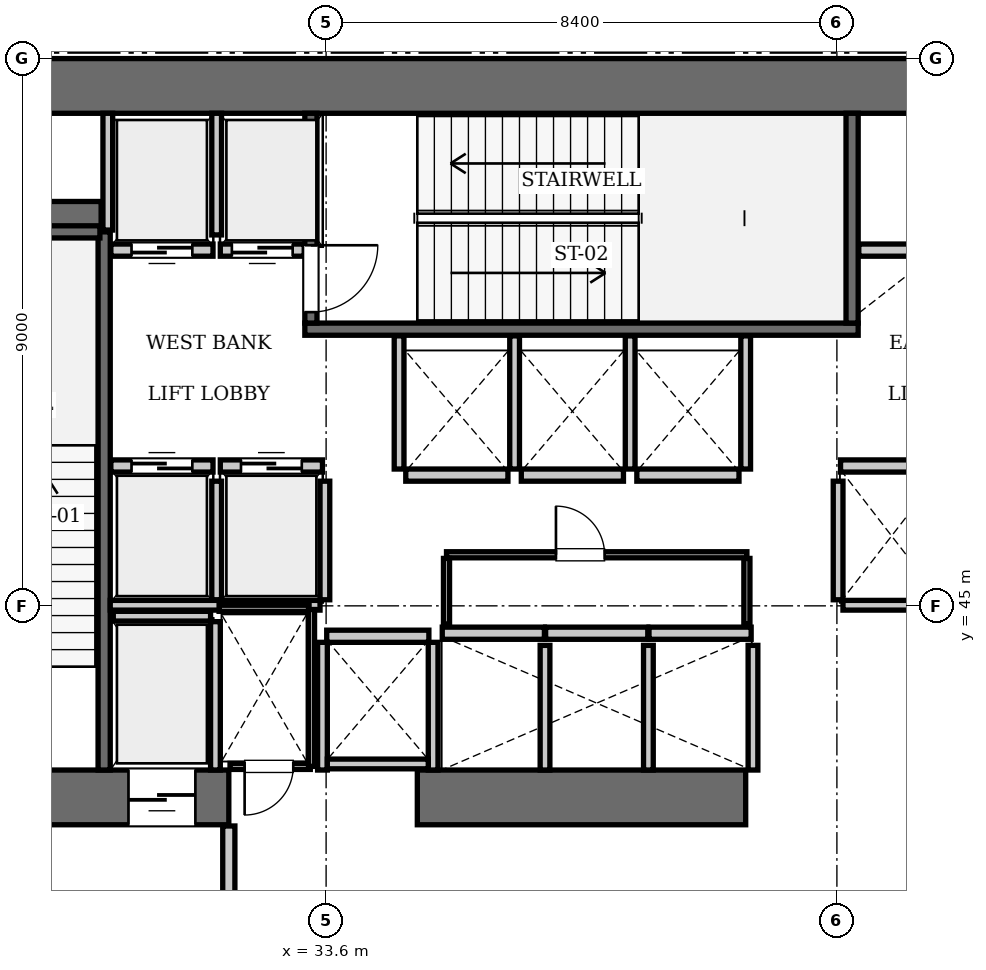
"""IFC4 building model, lengths in metres.
Left out: names, types, materials, properties, quantities, classifications, styles, units other than length and angle.
Written with IfcOpenShell. Run it as: python <this file> out.ifc"""

import sys

from ifc_helpers import new_model, si_unit, direction, frame, frame_2d, origin, place, context, subcontext, project, spatial, rectangle, extrude, element, fill, save


model = new_model("IFC4")
c1 = context("Model", 3, precision=1e-05, world=origin(), true_north=direction((0.0, 1.0)))
c2 = subcontext(c1, "Body", "Model", "MODEL_VIEW")
j1 = project(units=[si_unit("LENGTHUNIT", "METRE"), si_unit("PLANEANGLEUNIT", "RADIAN")], contexts=[c1])
p1 = place(None, origin())
s1 = spatial("IfcSite", under=j1, at=p1, CompositionType="ELEMENT")
p2 = place(p1, origin())
s2 = spatial("IfcBuilding", under=s1, at=p2, CompositionType="ELEMENT")
p3 = place(p2, frame((0.0, 0.0, 16.45)))
s3 = spatial("IfcBuildingStorey", under=s2, at=p3, CompositionType="ELEMENT", Elevation=16.45)
p4 = place(p3, frame((25.2, 53.55, 0.0), z_axis=(0.0, 0.0, 1.0), x_axis=(1.0, 0.0, 0.0)))
e1 = element("IfcWall", 1, at=p4, inside=s3, PredefinedType="SHEAR", context=c2, shape_type="SweptSolid", body=[
    extrude(rectangle(XDim=25.2, YDim=0.9, at=frame_2d((12.6, 0.0))), origin(), (0.0, 0.0, 1.0), 4.9),
])
p5 = place(p3, frame((25.2, 41.85, 0.0), z_axis=(0.0, 0.0, 1.0), x_axis=(1.0, 0.0, 0.0)))
e2 = element("IfcWall", 2, at=p5, inside=s3, PredefinedType="SHEAR", context=c2, shape_type="SweptSolid", body=[
    extrude(rectangle(XDim=6.8, YDim=0.9, at=frame_2d((3.4, 0.0))), origin(), (0.0, 0.0, 1.0), 4.9),
])
p6 = place(p5, frame((1.65, 0.0, 0.0)))
e3 = element("IfcOpeningElement", 3, at=p6, cuts=e2, PredefinedType="OPENING", context=c2, shape_type="SweptSolid", body=[
    extrude(rectangle(XDim=1.15, YDim=2.15, at=frame_2d((0.575, 1.075))), frame((0.0, 0.46, 0.0), z_axis=(0.0, -1.0, 0.0), x_axis=(1.0, 0.0, 0.0)), (0.0, 0.0, 1.0), 0.92),
])
p7 = place(p5, frame((5.15, 0.0, 0.0)))
e4 = element("IfcOpeningElement", 4, at=p7, cuts=e2, PredefinedType="OPENING", context=c2, shape_type="SweptSolid", body=[
    extrude(rectangle(XDim=1.1, YDim=2.2, at=frame_2d((0.55, 1.1))), frame((0.0, 0.46, 0.0), z_axis=(0.0, -1.0, 0.0), x_axis=(1.0, 0.0, 0.0)), (0.0, 0.0, 1.0), 0.92),
])
p8 = place(p3, frame((35.1, 41.85, 0.0), z_axis=(0.0, 0.0, 1.0), x_axis=(1.0, 0.0, 0.0)))
e5 = element("IfcWall", 5, at=p8, inside=s3, PredefinedType="SHEAR", context=c2, shape_type="SweptSolid", body=[
    extrude(rectangle(XDim=5.4, YDim=0.9, at=frame_2d((2.7, 0.0))), origin(), (0.0, 0.0, 1.0), 4.9),
])
p9 = place(p3, frame((26.1, 51.4, 0.0), z_axis=(0.0, 0.0, 1.0), x_axis=(1.0, 0.0, 0.0)))
e6 = element("IfcWall", 6, at=p9, inside=s3, PredefinedType="SHEAR", context=c2, shape_type="SweptSolid", body=[
    extrude(rectangle(XDim=3.8, YDim=0.5, at=frame_2d((1.9, 0.0))), origin(), (0.0, 0.0, 1.0), 4.9),
])
p10 = place(p3, frame((29.95, 42.3, 0.0), z_axis=(0.0, 0.0, 1.0), x_axis=(0.0, 1.0, 0.0)))
e7 = element("IfcWall", 7, at=p10, inside=s3, PredefinedType="SOLIDWALL", context=c2, shape_type="SweptSolid", body=[
    extrude(rectangle(XDim=8.85, YDim=0.2, at=frame_2d((4.425, 0.0))), origin(), (0.0, 0.0, 1.0), 4.62),
])
p11 = place(p3, frame((26.38, 51.15, 0.0), z_axis=(0.0, 0.0, 1.0), x_axis=(1.0, 0.0, 0.0)))
e8 = element("IfcWall", 8, at=p11, inside=s3, PredefinedType="SOLIDWALL", context=c2, shape_type="SweptSolid", body=[
    extrude(rectangle(XDim=3.5, YDim=0.2, at=frame_2d((1.75, 0.0))), origin(), (0.0, 0.0, 1.0), 4.62),
])
p12 = place(p3, frame((33.25, 49.55, 0.0), z_axis=(0.0, 0.0, 1.0), x_axis=(1.0, 0.0, 0.0)))
e9 = element("IfcWall", 9, at=p12, inside=s3, PredefinedType="SOLIDWALL", context=c2, shape_type="SweptSolid", body=[
    extrude(rectangle(XDim=9.1, YDim=0.2, at=frame_2d((4.55, 0.0))), origin(), (0.0, 0.0, 1.0), 4.62),
])
p13 = place(p3, frame((42.25, 49.65, 0.0), z_axis=(0.0, 0.0, 1.0), x_axis=(0.0, 1.0, 0.0)))
e10 = element("IfcWall", 10, at=p13, inside=s3, PredefinedType="SOLIDWALL", context=c2, shape_type="SweptSolid", body=[
    extrude(rectangle(XDim=3.45, YDim=0.2, at=frame_2d((1.725, 0.0))), origin(), (0.0, 0.0, 1.0), 4.62),
])
p14 = place(p3, frame((33.35, 49.65, 0.0), z_axis=(0.0, 0.0, 1.0), x_axis=(0.0, 1.0, 0.0)))
e11 = element("IfcWall", 11, at=p14, inside=s3, PredefinedType="SOLIDWALL", context=c2, shape_type="SweptSolid", body=[
    extrude(rectangle(XDim=3.45, YDim=0.2, at=frame_2d((1.725, 0.0))), origin(), (0.0, 0.0, 1.0), 4.62),
])
p15 = place(p14, frame((0.18, 0.0, 0.0)))
e12 = element("IfcOpeningElement", 12, at=p15, cuts=e11, PredefinedType="OPENING", context=c2, shape_type="SweptSolid", body=[
    extrude(rectangle(XDim=1.1, YDim=2.15, at=frame_2d((0.55, 1.075))), frame((0.0, 0.11, 0.0), z_axis=(0.0, -1.0, 0.0), x_axis=(1.0, 0.0, 0.0)), (0.0, 0.0, 1.0), 0.22),
])
p16 = place(p3, frame((30.06, 47.3, 0.0), z_axis=(0.0, 0.0, 1.0), x_axis=(1.0, 0.0, 0.0)))
e13 = element("IfcWall", 13, at=p16, inside=s3, PredefinedType="SOLIDWALL", context=c2, shape_type="SweptSolid", body=[
    extrude(rectangle(XDim=1.68, YDim=0.2, at=frame_2d((0.84, 0.0))), origin(), (0.0, 0.0, 1.0), 4.62),
])
p17 = place(p16, frame((0.34, 0.0, 0.0)))
e14 = element("IfcOpeningElement", 14, at=p17, cuts=e13, PredefinedType="OPENING", context=c2, shape_type="SweptSolid", body=[
    extrude(rectangle(XDim=1.0, YDim=2.15, at=frame_2d((0.5, 1.075))), frame((0.0, 0.11, 0.0), z_axis=(0.0, -1.0, 0.0), x_axis=(1.0, 0.0, 0.0)), (0.0, 0.0, 1.0), 0.22),
])
p18 = place(p3, frame((31.86, 47.3, 0.0), z_axis=(0.0, 0.0, 1.0), x_axis=(1.0, 0.0, 0.0)))
e15 = element("IfcWall", 15, at=p18, inside=s3, PredefinedType="SOLIDWALL", context=c2, shape_type="SweptSolid", body=[
    extrude(rectangle(XDim=1.68, YDim=0.2, at=frame_2d((0.84, 0.0))), origin(), (0.0, 0.0, 1.0), 4.62),
])
p19 = place(p18, frame((0.34, 0.0, 0.0)))
e16 = element("IfcOpeningElement", 16, at=p19, cuts=e15, PredefinedType="OPENING", context=c2, shape_type="SweptSolid", body=[
    extrude(rectangle(XDim=1.0, YDim=2.15, at=frame_2d((0.5, 1.075))), frame((0.0, 0.11, 0.0), z_axis=(0.0, -1.0, 0.0), x_axis=(1.0, 0.0, 0.0)), (0.0, 0.0, 1.0), 0.22),
])
p20 = place(p3, frame((30.06, 50.85, 0.0), z_axis=(0.0, 0.0, 1.0), x_axis=(1.0, 0.0, 0.0)))
e17 = element("IfcWall", 17, at=p20, inside=s3, PredefinedType="SOLIDWALL", context=c2, shape_type="SweptSolid", body=[
    extrude(rectangle(XDim=1.68, YDim=0.2, at=frame_2d((0.84, 0.0))), origin(), (0.0, 0.0, 1.0), 4.62),
])
p21 = place(p20, frame((0.34, 0.0, 0.0)))
e18 = element("IfcOpeningElement", 18, at=p21, cuts=e17, PredefinedType="OPENING", context=c2, shape_type="SweptSolid", body=[
    extrude(rectangle(XDim=1.0, YDim=2.15, at=frame_2d((0.5, 1.075))), frame((0.0, 0.11, 0.0), z_axis=(0.0, -1.0, 0.0), x_axis=(1.0, 0.0, 0.0)), (0.0, 0.0, 1.0), 0.22),
])
p22 = place(p3, frame((31.86, 50.85, 0.0), z_axis=(0.0, 0.0, 1.0), x_axis=(1.0, 0.0, 0.0)))
e19 = element("IfcWall", 19, at=p22, inside=s3, PredefinedType="SOLIDWALL", context=c2, shape_type="SweptSolid", body=[
    extrude(rectangle(XDim=1.38, YDim=0.2, at=frame_2d((0.69, 0.0))), origin(), (0.0, 0.0, 1.0), 4.62),
])
p23 = place(p22, frame((0.19, 0.0, 0.0)))
e20 = element("IfcOpeningElement", 20, at=p23, cuts=e19, PredefinedType="OPENING", context=c2, shape_type="SweptSolid", body=[
    extrude(rectangle(XDim=1.0, YDim=2.15, at=frame_2d((0.5, 1.075))), frame((0.0, 0.11, 0.0), z_axis=(0.0, -1.0, 0.0), x_axis=(1.0, 0.0, 0.0)), (0.0, 0.0, 1.0), 0.22),
])
p24 = place(p3, frame((42.06, 47.3, 0.0), z_axis=(0.0, 0.0, 1.0), x_axis=(1.0, 0.0, 0.0)))
e21 = element("IfcWall", 21, at=p24, inside=s3, PredefinedType="SOLIDWALL", context=c2, shape_type="SweptSolid", body=[
    extrude(rectangle(XDim=1.68, YDim=0.2, at=frame_2d((0.84, 0.0))), origin(), (0.0, 0.0, 1.0), 4.62),
])
p25 = place(p3, frame((42.36, 50.85, 0.0), z_axis=(0.0, 0.0, 1.0), x_axis=(1.0, 0.0, 0.0)))
e22 = element("IfcWall", 22, at=p25, inside=s3, PredefinedType="SOLIDWALL", context=c2, shape_type="SweptSolid", body=[
    extrude(rectangle(XDim=1.38, YDim=0.2, at=frame_2d((0.69, 0.0))), origin(), (0.0, 0.0, 1.0), 4.62),
])
for number, where, z_axis, x_axis in (
    (23, (35.51, 44.55, 0.0), (0.0, 0.0, 1.0), (1.0, 0.0, 0.0)),
    (24, (37.21, 44.55, 0.0), (0.0, 0.0, 1.0), (1.0, 0.0, 0.0)),
):
    element("IfcWall", number, at=place(p3, frame(where, z_axis=z_axis, x_axis=x_axis)), inside=s3, PredefinedType="SOLIDWALL", context=c2, shape_type="SweptSolid", body=[
        extrude(rectangle(XDim=1.68, YDim=0.2, at=frame_2d((0.84, 0.0))), origin(), (0.0, 0.0, 1.0), 4.62),
    ])
for number, where, z_axis, x_axis in (
    (25, (38.91, 44.55, 0.0), (0.0, 0.0, 1.0), (1.0, 0.0, 0.0)),
    (26, (34.91, 47.15, 0.0), (0.0, 0.0, 1.0), (1.0, 0.0, 0.0)),
):
    element("IfcWall", number, at=place(p3, frame(where, z_axis=z_axis, x_axis=x_axis)), inside=s3, PredefinedType="SOLIDWALL", context=c2, shape_type="SweptSolid", body=[
        extrude(rectangle(XDim=1.68, YDim=0.2, at=frame_2d((0.84, 0.0))), origin(), (0.0, 0.0, 1.0), 4.62),
    ])
for number, where, z_axis, x_axis in (
    (27, (36.81, 47.15, 0.0), (0.0, 0.0, 1.0), (1.0, 0.0, 0.0)),
    (28, (38.71, 47.15, 0.0), (0.0, 0.0, 1.0), (1.0, 0.0, 0.0)),
    (29, (33.61, 44.5, 0.0), (0.0, 0.0, 1.0), (1.0, 0.0, 0.0)),
):
    element("IfcWall", number, at=place(p3, frame(where, z_axis=z_axis, x_axis=x_axis)), inside=s3, PredefinedType="SOLIDWALL", context=c2, shape_type="SweptSolid", body=[
        extrude(rectangle(XDim=1.68, YDim=0.2, at=frame_2d((0.84, 0.0))), origin(), (0.0, 0.0, 1.0), 4.62),
    ])
p26 = place(p3, frame((30.1, 44.83, 0.0), z_axis=(0.0, 0.0, 1.0), x_axis=(1.0, 0.0, 0.0)))
e30 = element("IfcWall", 30, at=p26, inside=s3, PredefinedType="SOLIDWALL", context=c2, shape_type="SweptSolid", body=[
    extrude(rectangle(XDim=1.6, YDim=0.16, at=frame_2d((0.8, 0.0))), origin(), (0.0, 0.0, 1.0), 4.62),
])
p27 = place(p3, frame((31.78, 42.3, 0.0), z_axis=(0.0, 0.0, 1.0), x_axis=(0.0, 1.0, 0.0)))
e31 = element("IfcWall", 31, at=p27, inside=s3, PredefinedType="SOLIDWALL", context=c2, shape_type="SweptSolid", body=[
    extrude(rectangle(XDim=2.44, YDim=0.16, at=frame_2d((1.22, 0.0))), origin(), (0.0, 0.0, 1.0), 4.62),
])
for number, where, z_axis, x_axis in (
    (32, (31.8, 45.1, 0.0), (0.0, 0.0, 1.0), (0.0, 1.0, 0.0)),
    (33, (33.58, 45.1, 0.0), (0.0, 0.0, 1.0), (0.0, 1.0, 0.0)),
):
    element("IfcWall", number, at=place(p3, frame(where, z_axis=z_axis, x_axis=x_axis)), inside=s3, PredefinedType="SOLIDWALL", context=c2, shape_type="SweptSolid", body=[
        extrude(rectangle(XDim=1.95, YDim=0.16, at=frame_2d((0.975, 0.0))), origin(), (0.0, 0.0, 1.0), 4.62),
    ])
p28 = place(p3, frame((30.05, 45.01, 0.0), z_axis=(0.0, 0.0, 1.0), x_axis=(1.0, 0.0, 0.0)))
e34 = element("IfcWall", 34, at=p28, inside=s3, PredefinedType="SOLIDWALL", context=c2, shape_type="SweptSolid", body=[
    extrude(rectangle(XDim=3.45, YDim=0.16, at=frame_2d((1.725, 0.0))), origin(), (0.0, 0.0, 1.0), 4.62),
])
p29 = place(p3, frame((30.01, 51.18, 0.0), z_axis=(0.0, 0.0, 1.0), x_axis=(0.0, 1.0, 0.0)))
e35 = element("IfcWall", 35, at=p29, inside=s3, PredefinedType="SOLIDWALL", context=c2, shape_type="SweptSolid", body=[
    extrude(rectangle(XDim=1.92, YDim=0.16, at=frame_2d((0.96, 0.0))), origin(), (0.0, 0.0, 1.0), 4.62),
])
p30 = place(p3, frame((31.8, 51.1, 0.0), z_axis=(0.0, 0.0, 1.0), x_axis=(0.0, 1.0, 0.0)))
e36 = element("IfcWall", 36, at=p30, inside=s3, PredefinedType="SOLIDWALL", context=c2, shape_type="SweptSolid", body=[
    extrude(rectangle(XDim=2.0, YDim=0.16, at=frame_2d((1.0, 0.0))), origin(), (0.0, 0.0, 1.0), 4.62),
])
p31 = place(p3, frame((42.02, 45.1, 0.0), z_axis=(0.0, 0.0, 1.0), x_axis=(0.0, 1.0, 0.0)))
e37 = element("IfcWall", 37, at=p31, inside=s3, PredefinedType="SOLIDWALL", context=c2, shape_type="SweptSolid", body=[
    extrude(rectangle(XDim=1.95, YDim=0.16, at=frame_2d((0.975, 0.0))), origin(), (0.0, 0.0, 1.0), 4.62),
])
p32 = place(p3, frame((42.1, 45.01, 0.0), z_axis=(0.0, 0.0, 1.0), x_axis=(1.0, 0.0, 0.0)))
e38 = element("IfcWall", 38, at=p32, inside=s3, PredefinedType="SOLIDWALL", context=c2, shape_type="SweptSolid", body=[
    extrude(rectangle(XDim=3.45, YDim=0.16, at=frame_2d((1.725, 0.0))), origin(), (0.0, 0.0, 1.0), 4.62),
])
for number, where, z_axis, x_axis in (
    (39, (37.2, 42.3, 0.0), (0.0, 0.0, 1.0), (0.0, 1.0, 0.0)),
    (40, (38.9, 42.3, 0.0), (0.0, 0.0, 1.0), (0.0, 1.0, 0.0)),
    (41, (40.62, 42.3, 0.0), (0.0, 0.0, 1.0), (0.0, 1.0, 0.0)),
):
    element("IfcWall", number, at=place(p3, frame(where, z_axis=z_axis, x_axis=x_axis)), inside=s3, PredefinedType="SOLIDWALL", context=c2, shape_type="SweptSolid", body=[
        extrude(rectangle(XDim=2.05, YDim=0.16, at=frame_2d((1.025, 0.0))), origin(), (0.0, 0.0, 1.0), 4.62),
    ])
for number, where, z_axis, x_axis in (
    (42, (34.8, 47.25, 0.0), (0.0, 0.0, 1.0), (0.0, 1.0, 0.0)),
    (43, (36.7, 47.25, 0.0), (0.0, 0.0, 1.0), (0.0, 1.0, 0.0)),
    (44, (38.6, 47.25, 0.0), (0.0, 0.0, 1.0), (0.0, 1.0, 0.0)),
    (45, (40.5, 47.25, 0.0), (0.0, 0.0, 1.0), (0.0, 1.0, 0.0)),
):
    element("IfcWall", number, at=place(p3, frame(where, z_axis=z_axis, x_axis=x_axis)), inside=s3, PredefinedType="SOLIDWALL", context=c2, shape_type="SweptSolid", body=[
        extrude(rectangle(XDim=2.19, YDim=0.16, at=frame_2d((1.095, 0.0))), origin(), (0.0, 0.0, 1.0), 4.62),
    ])
for number, where, z_axis, x_axis in (
    (46, (33.54, 42.3, 0.0), (0.0, 0.0, 1.0), (0.0, 1.0, 0.0)),
    (47, (35.36, 42.3, 0.0), (0.0, 0.0, 1.0), (0.0, 1.0, 0.0)),
):
    element("IfcWall", number, at=place(p3, frame(where, z_axis=z_axis, x_axis=x_axis)), inside=s3, PredefinedType="SOLIDWALL", context=c2, shape_type="SweptSolid", body=[
        extrude(rectangle(XDim=2.1, YDim=0.16, at=frame_2d((1.05, 0.0))), origin(), (0.0, 0.0, 1.0), 4.62),
    ])
p33 = place(p3, frame((33.62, 42.4, 0.0), z_axis=(0.0, 0.0, 1.0), x_axis=(1.0, 0.0, 0.0)))
e48 = element("IfcWall", 48, at=p33, inside=s3, PredefinedType="SOLIDWALL", context=c2, shape_type="SweptSolid", body=[
    extrude(rectangle(XDim=1.66, YDim=0.16, at=frame_2d((0.83, 0.0))), origin(), (0.0, 0.0, 1.0), 4.62),
])
p34 = place(p3, frame((32.0, 38.31, 0.0), z_axis=(0.0, 0.0, 1.0), x_axis=(0.0, 1.0, 0.0)))
e49 = element("IfcWall", 49, at=p34, inside=s3, PredefinedType="PARTITIONING", context=c2, shape_type="SweptSolid", body=[
    extrude(rectangle(XDim=3.07, YDim=0.2, at=frame_2d((1.535, 0.0))), origin(), (0.0, 0.0, 1.0), 4.62),
])
p35 = place(p3, frame((32.02, 42.36, 0.0), z_axis=(0.0, 0.0, 1.0), x_axis=(1.0, 0.0, 0.0)))
e50 = element("IfcWall", 50, at=p35, inside=s3, PredefinedType="PARTITIONING", context=c2, shape_type="SweptSolid", body=[
    extrude(rectangle(XDim=1.32, YDim=0.1, at=frame_2d((0.66, 0.0))), origin(), (0.0, 0.0, 1.0), 4.62),
])
p36 = place(p35, frame((0.24, 0.0, 0.0)))
e51 = element("IfcOpeningElement", 51, at=p36, cuts=e50, PredefinedType="OPENING", context=c2, shape_type="SweptSolid", body=[
    extrude(rectangle(XDim=0.8, YDim=2.05, at=frame_2d((0.4, 1.025))), frame((0.0, 0.06, 0.0), z_axis=(0.0, -1.0, 0.0), x_axis=(1.0, 0.0, 0.0)), (0.0, 0.0, 1.0), 0.12),
])
p37 = place(p3, frame((31.84, 44.96, 0.0), z_axis=(0.0, 0.0, 1.0), x_axis=(1.0, 0.0, 0.0)))
e52 = element("IfcWall", 52, at=p37, inside=s3, PredefinedType="PARTITIONING", context=c2, shape_type="SweptSolid", body=[
    extrude(rectangle(XDim=1.48, YDim=0.1, at=frame_2d((0.74, 0.0))), origin(), (0.0, 0.0, 1.0), 4.62),
])
p38 = place(p3, frame((33.36, 42.36, 0.0), z_axis=(0.0, 0.0, 1.0), x_axis=(0.0, 1.0, 0.0)))
e53 = element("IfcWall", 53, at=p38, inside=s3, PredefinedType="PARTITIONING", context=c2, shape_type="SweptSolid", body=[
    extrude(rectangle(XDim=2.58, YDim=0.1, at=frame_2d((1.29, 0.0))), origin(), (0.0, 0.0, 1.0), 4.62),
])
p39 = place(p3, frame((35.58, 45.84, 0.0), z_axis=(0.0, 0.0, 1.0), x_axis=(1.0, 0.0, 0.0)))
e54 = element("IfcWall", 54, at=p39, inside=s3, PredefinedType="PARTITIONING", context=c2, shape_type="SweptSolid", body=[
    extrude(rectangle(XDim=4.94, YDim=0.1, at=frame_2d((2.47, 0.0))), origin(), (0.0, 0.0, 1.0), 4.62),
])
p40 = place(p39, frame((1.8, 0.0, 0.0)))
e55 = element("IfcOpeningElement", 55, at=p40, cuts=e54, PredefinedType="OPENING", context=c2, shape_type="SweptSolid", body=[
    extrude(rectangle(XDim=0.8, YDim=2.05, at=frame_2d((0.4, 1.025))), frame((0.0, 0.06, 0.0), z_axis=(0.0, -1.0, 0.0), x_axis=(1.0, 0.0, 0.0)), (0.0, 0.0, 1.0), 0.12),
])
for number, where, z_axis, x_axis in (
    (56, (35.58, 44.7, 0.0), (0.0, 0.0, 1.0), (0.0, 1.0, 0.0)),
    (57, (40.52, 44.7, 0.0), (0.0, 0.0, 1.0), (0.0, 1.0, 0.0)),
):
    element("IfcWall", number, at=place(p3, frame(where, z_axis=z_axis, x_axis=x_axis)), inside=s3, PredefinedType="PARTITIONING", context=c2, shape_type="SweptSolid", body=[
        extrude(rectangle(XDim=1.08, YDim=0.1, at=frame_2d((0.54, 0.0))), origin(), (0.0, 0.0, 1.0), 4.62),
    ])
p41 = place(p15, frame((1.1, 0.0, 0.0), z_axis=(0.0, 0.0, 1.0), x_axis=(-1.0, 0.0, 0.0)))
e58 = element("IfcDoor", 58, at=p41, inside=s3, OperationType="SINGLE_SWING_LEFT", PredefinedType="DOOR", context=c2, shape_type="SweptSolid", body=[
    extrude(rectangle(XDim=1.1, YDim=2.15, at=frame_2d((0.55, 1.075))), frame((0.0, 0.025, 0.0), z_axis=(0.0, -1.0, 0.0), x_axis=(1.0, 0.0, 0.0)), (0.0, 0.0, 1.0), 0.05),
])
fill(e12, e58)
p42 = place(p17, origin())
e59 = element("IfcDoor", 59, at=p42, inside=s3, OperationType="SLIDING_TO_LEFT", PredefinedType="DOOR", context=c2, shape_type="SweptSolid", body=[
    extrude(rectangle(XDim=1.0, YDim=2.15, at=frame_2d((0.5, 1.075))), frame((0.0, 0.025, 0.0), z_axis=(0.0, -1.0, 0.0), x_axis=(1.0, 0.0, 0.0)), (0.0, 0.0, 1.0), 0.05),
])
fill(e14, e59)
p43 = place(p19, origin())
e60 = element("IfcDoor", 60, at=p43, inside=s3, OperationType="SLIDING_TO_LEFT", PredefinedType="DOOR", context=c2, shape_type="SweptSolid", body=[
    extrude(rectangle(XDim=1.0, YDim=2.15, at=frame_2d((0.5, 1.075))), frame((0.0, 0.025, 0.0), z_axis=(0.0, -1.0, 0.0), x_axis=(1.0, 0.0, 0.0)), (0.0, 0.0, 1.0), 0.05),
])
fill(e16, e60)
p44 = place(p21, frame((1.0, 0.0, 0.0), z_axis=(0.0, 0.0, 1.0), x_axis=(-1.0, 0.0, 0.0)))
e61 = element("IfcDoor", 61, at=p44, inside=s3, OperationType="SLIDING_TO_LEFT", PredefinedType="DOOR", context=c2, shape_type="SweptSolid", body=[
    extrude(rectangle(XDim=1.0, YDim=2.15, at=frame_2d((0.5, 1.075))), frame((0.0, 0.025, 0.0), z_axis=(0.0, -1.0, 0.0), x_axis=(1.0, 0.0, 0.0)), (0.0, 0.0, 1.0), 0.05),
])
fill(e18, e61)
p45 = place(p23, frame((1.0, 0.0, 0.0), z_axis=(0.0, 0.0, 1.0), x_axis=(-1.0, 0.0, 0.0)))
e62 = element("IfcDoor", 62, at=p45, inside=s3, OperationType="SLIDING_TO_LEFT", PredefinedType="DOOR", context=c2, shape_type="SweptSolid", body=[
    extrude(rectangle(XDim=1.0, YDim=2.15, at=frame_2d((0.5, 1.075))), frame((0.0, 0.025, 0.0), z_axis=(0.0, -1.0, 0.0), x_axis=(1.0, 0.0, 0.0)), (0.0, 0.0, 1.0), 0.05),
])
fill(e20, e62)
p46 = place(p7, frame((1.1, 0.0, 0.0), z_axis=(0.0, 0.0, 1.0), x_axis=(-1.0, 0.0, 0.0)))
e63 = element("IfcDoor", 63, at=p46, inside=s3, OperationType="SLIDING_TO_LEFT", PredefinedType="DOOR", context=c2, shape_type="SweptSolid", body=[
    extrude(rectangle(XDim=1.1, YDim=2.2, at=frame_2d((0.55, 1.1))), frame((0.0, 0.025, 0.0), z_axis=(0.0, -1.0, 0.0), x_axis=(1.0, 0.0, 0.0)), (0.0, 0.0, 1.0), 0.05),
])
fill(e4, e63)
p47 = place(p36, frame((0.8, 0.0, 0.0), z_axis=(0.0, 0.0, 1.0), x_axis=(-1.0, 0.0, 0.0)))
e64 = element("IfcDoor", 64, at=p47, inside=s3, OperationType="SINGLE_SWING_RIGHT", PredefinedType="DOOR", context=c2, shape_type="SweptSolid", body=[
    extrude(rectangle(XDim=0.8, YDim=2.05, at=frame_2d((0.4, 1.025))), frame((0.0, 0.025, 0.0), z_axis=(0.0, -1.0, 0.0), x_axis=(1.0, 0.0, 0.0)), (0.0, 0.0, 1.0), 0.05),
])
fill(e51, e64)
p48 = place(p40, origin())
e65 = element("IfcDoor", 65, at=p48, inside=s3, OperationType="SINGLE_SWING_LEFT", PredefinedType="DOOR", context=c2, shape_type="SweptSolid", body=[
    extrude(rectangle(XDim=0.8, YDim=2.05, at=frame_2d((0.4, 1.025))), frame((0.0, 0.025, 0.0), z_axis=(0.0, -1.0, 0.0), x_axis=(1.0, 0.0, 0.0)), (0.0, 0.0, 1.0), 0.05),
])
fill(e55, e65)
save(model, sys.argv[1])
